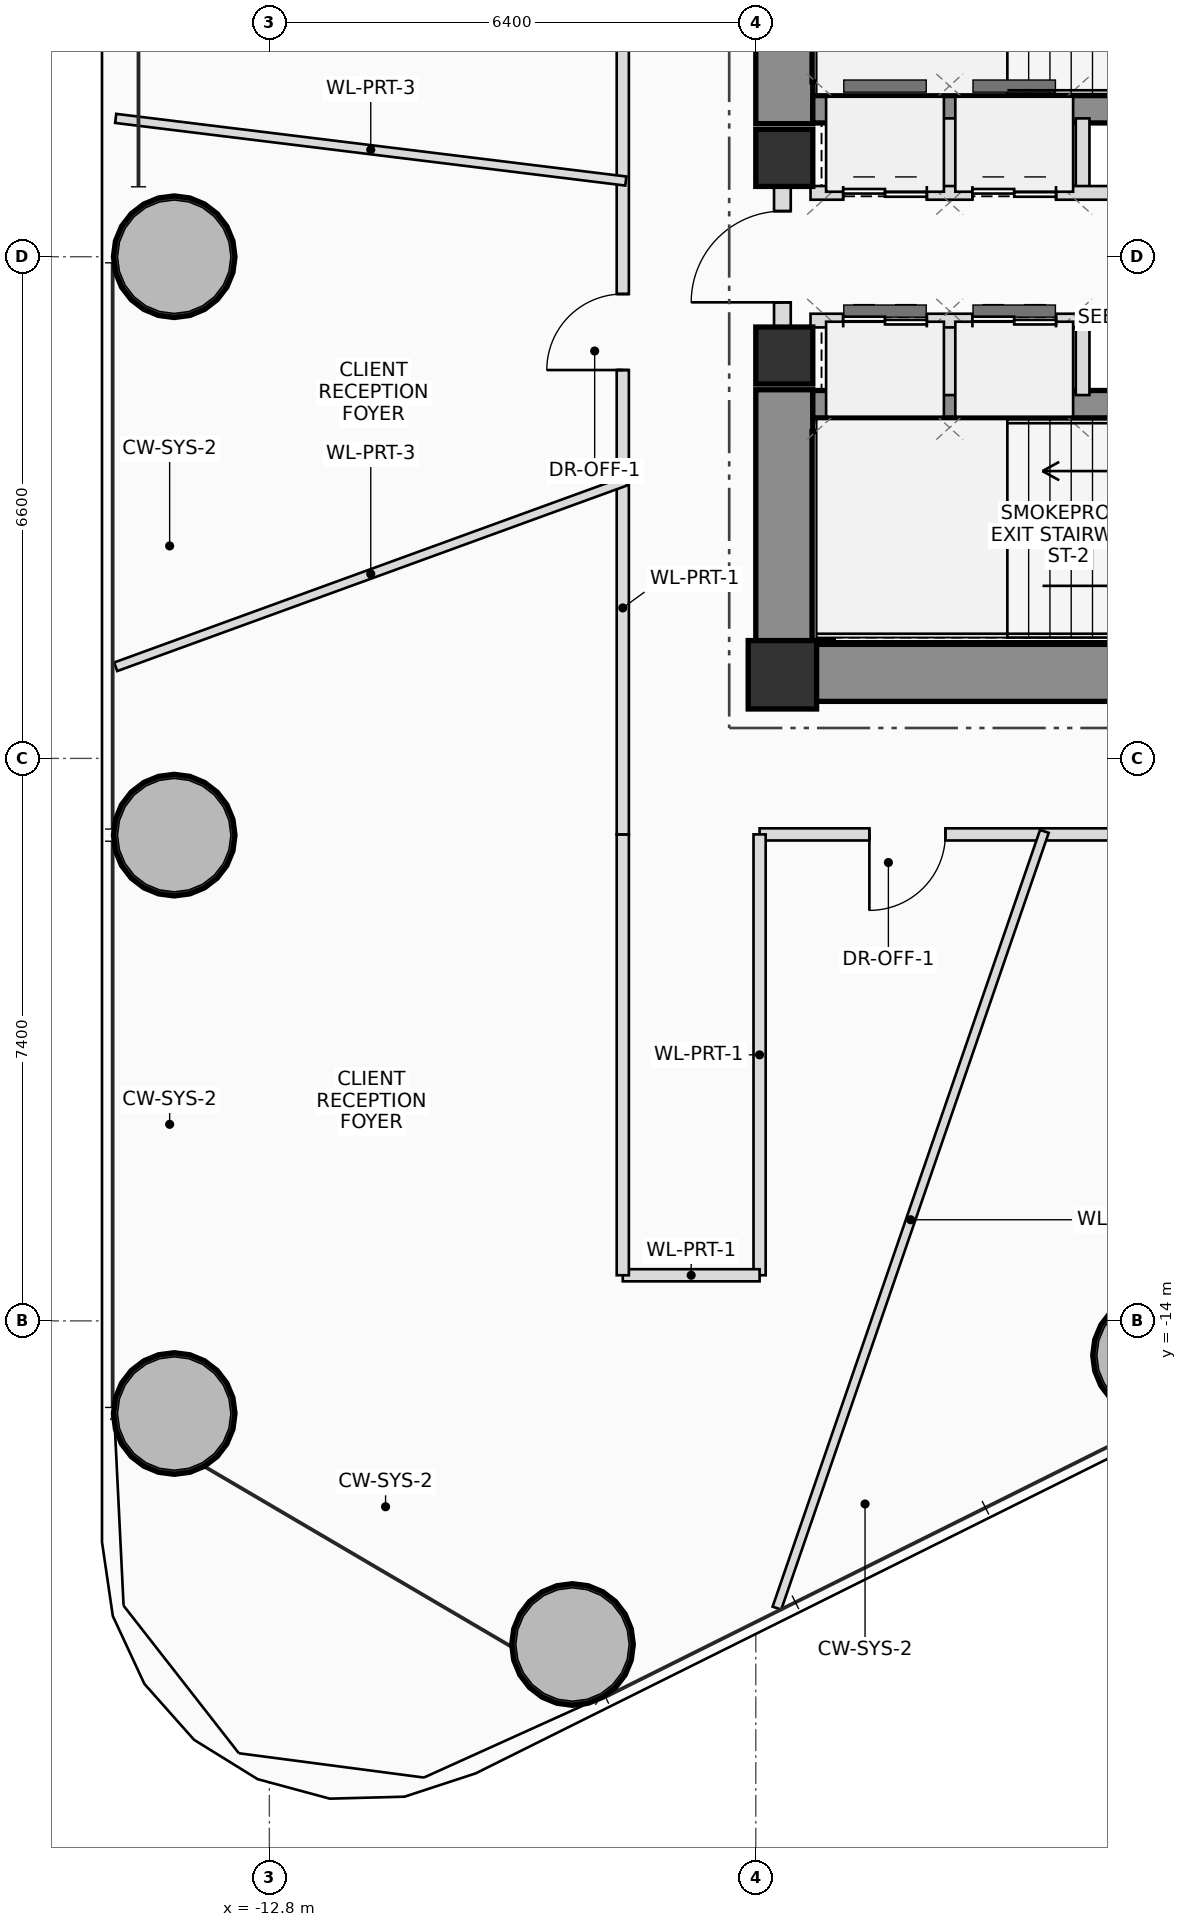
"""IFC4 building model, lengths in metres.
Left out: names, types, materials, properties, quantities, classifications, styles, units other than length and angle.
Written with IfcOpenShell. Run it as: python <this file> out.ifc"""

import sys

from ifc_helpers import new_model, si_unit, direction, frame, frame_2d, origin, origin_2d, place, context, subcontext, project, spatial, rectangle, hollow_circle, extrude, source, transform, mapped, element, fill, save


model = new_model("IFC4")
c1 = context("Model", 3, precision=1e-05, world=origin(), true_north=direction((0.0, 1.0)))
c2 = subcontext(c1, "Body", "Model", "MODEL_VIEW")
j1 = project(units=[si_unit("LENGTHUNIT", "METRE"), si_unit("PLANEANGLEUNIT", "RADIAN")], contexts=[c1])
p1 = place(None, origin())
s1 = spatial("IfcSite", under=j1, at=p1, CompositionType="ELEMENT")
p2 = place(p1, origin())
s2 = spatial("IfcBuilding", under=s1, at=p2, CompositionType="ELEMENT")
p3 = place(p2, frame((0.0, 0.0, 46.0)))
s3 = spatial("IfcBuildingStorey", under=s2, at=p3, CompositionType="ELEMENT", Elevation=46.0)
m1 = source(origin(), c2, "Body", "SweptSolid", [
    extrude(rectangle(XDim=0.9, YDim=0.9, at=origin_2d()), origin(), (0.0, 0.0, 1.0), 3.7),
])
p4 = place(p3, frame((-6.05, -5.5, 0.0), z_axis=(0.0, 0.0, 1.0), x_axis=(1.0, 0.0, 0.0)))
e1 = element("IfcColumn", 1, at=p4, inside=s3, PredefinedType="COLUMN", context=c2, shape_type="MappedRepresentation", body=[
    mapped(m1, transform((0.0, 0.0, 0.0), scale=1.0)),
])
p5 = place(p3, frame((-6.4, -5.475, 0.0), z_axis=(0.0, 0.0, 1.0), x_axis=(1.0, 0.0, 0.0)))
e2 = element("IfcWall", 2, at=p5, inside=s3, PredefinedType="SHEAR", context=c2, shape_type="SweptSolid", body=[
    extrude(rectangle(XDim=12.8, YDim=0.75, at=frame_2d((6.4, 0.0))), origin(), (0.0, 0.0, 1.0), 3.7),
])
p6 = place(p5, frame((8.6, 0.0, 0.0)))
e3 = element("IfcOpeningElement", 3, at=p6, cuts=e2, PredefinedType="OPENING", context=c2, shape_type="SweptSolid", body=[
    extrude(rectangle(XDim=1.2, YDim=2.2, at=frame_2d((0.6, 1.1))), frame((0.0, 0.385, 0.0), z_axis=(0.0, -1.0, 0.0), x_axis=(1.0, 0.0, 0.0)), (0.0, 0.0, 1.0), 0.77),
])
for number, where, z_axis, x_axis in (
    (4, (-6.025, -5.1, 0.0), (0.0, 0.0, 1.0), (0.0, 1.0, 0.0)),
    (5, (-6.025, 1.75, 0.0), (0.0, 0.0, 1.0), (0.0, 1.0, 0.0)),
):
    element("IfcWall", number, at=place(p3, frame(where, z_axis=z_axis, x_axis=x_axis)), inside=s3, PredefinedType="SHEAR", context=c2, shape_type="SweptSolid", body=[
        extrude(rectangle(XDim=3.35, YDim=0.75, at=frame_2d((1.675, 0.0))), origin(), (0.0, 0.0, 1.0), 3.7),
    ])
for number, where, z_axis, x_axis in (
    (6, (-5.65, 1.94, 0.0), (0.0, 0.0, 1.0), (1.0, 0.0, 0.0)),
    (7, (-5.65, -1.94, 0.0), (0.0, 0.0, 1.0), (1.0, 0.0, 0.0)),
):
    element("IfcWall", number, at=place(p3, frame(where, z_axis=z_axis, x_axis=x_axis)), inside=s3, PredefinedType="SHEAR", context=c2, shape_type="SweptSolid", body=[
        extrude(rectangle(XDim=11.3, YDim=0.36, at=frame_2d((5.65, 0.0))), origin(), (0.0, 0.0, 1.0), 3.7),
    ])
for number, where, z_axis, x_axis in (
    (8, (-5.52, 2.3, 0.0), (0.0, 0.0, 1.0), (0.0, 1.0, 0.0)),
    (9, (-5.52, -5.05, 0.0), (0.0, 0.0, 1.0), (0.0, 1.0, 0.0)),
):
    element("IfcWall", number, at=place(p3, frame(where, z_axis=z_axis, x_axis=x_axis)), inside=s3, PredefinedType="SHEAR", context=c2, shape_type="SweptSolid", body=[
        extrude(rectangle(XDim=2.75, YDim=0.28, at=frame_2d((1.375, 0.0))), origin(), (0.0, 0.0, 1.0), 3.7),
    ])
m2 = source(origin(), c2, "Body", "SweptSolid", [
    extrude(rectangle(XDim=0.75, YDim=0.75, at=origin_2d()), origin(), (0.0, 0.0, 1.0), 3.7),
])
for number, where, z_axis, x_axis in (
    (10, (-6.025, -1.3, 0.0), (0.0, 0.0, 1.0), (1.0, 0.0, 0.0)),
    (11, (-6.025, 1.3, 0.0), (0.0, 0.0, 1.0), (1.0, 0.0, 0.0)),
):
    element("IfcColumn", number, at=place(p3, frame(where, z_axis=z_axis, x_axis=x_axis)), inside=s3, PredefinedType="COLUMN", context=c2, shape_type="MappedRepresentation", body=[
        mapped(m2, transform((0.0, 0.0, 0.0), scale=1.0)),
    ])
m3 = source(origin(), c2, "Body", "SweptSolid", [
    extrude(hollow_circle(Radius=0.8, WallThickness=0.055, at=origin_2d()), origin(), (0.0, 0.0, 1.0), 3.7),
])
for number, where, z_axis, x_axis in (
    (12, (-8.812, -18.258, 0.0), (0.0, 0.0, 1.0), (1.0, 0.0, 0.0)),
    (13, (-1.167, -14.453, 0.0), (0.0, 0.0, 1.0), (1.0, 0.0, 0.0)),
    (14, (-14.052, 0.0, 0.0), (0.0, 0.0, 1.0), (1.0, 0.0, 0.0)),
    (15, (-14.052, -7.61, 0.0), (0.0, 0.0, 1.0), (1.0, 0.0, 0.0)),
    (16, (-14.052, -15.219, 0.0), (0.0, 0.0, 1.0), (1.0, 0.0, 0.0)),
):
    element("IfcColumn", number, at=place(p3, frame(where, z_axis=z_axis, x_axis=x_axis)), inside=s3, PredefinedType="COLUMN", context=c2, shape_type="MappedRepresentation", body=[
        mapped(m3, transform((0.0, 0.0, 0.0), scale=1.0)),
    ])
p7 = place(p3, frame((-6.05, -0.95, 0.0), z_axis=(0.0, 0.0, 1.0), x_axis=(0.0, 1.0, 0.0)))
e17 = element("IfcWall", 17, at=p7, inside=s3, PredefinedType="PLUMBINGWALL", context=c2, shape_type="SweptSolid", body=[
    extrude(rectangle(XDim=1.9, YDim=0.22, at=frame_2d((0.95, 0.0))), origin(), (0.0, 0.0, 1.0), 2.44),
])
p8 = place(p7, frame((0.35, 0.0, 0.0)))
e18 = element("IfcOpeningElement", 18, at=p8, cuts=e17, PredefinedType="OPENING", context=c2, shape_type="SweptSolid", body=[
    extrude(rectangle(XDim=1.2, YDim=2.2, at=frame_2d((0.6, 1.1))), frame((0.0, 0.12, 0.0), z_axis=(0.0, -1.0, 0.0), x_axis=(1.0, 0.0, 0.0)), (0.0, 0.0, 1.0), 0.24),
])
for number, where, z_axis, x_axis in (
    (19, (-3.85, 0.84, 0.0), (0.0, 0.0, 1.0), (0.0, 1.0, 0.0)),
    (20, (-3.85, -1.82, 0.0), (0.0, 0.0, 1.0), (0.0, 1.0, 0.0)),
    (21, (-2.1, 0.84, 0.0), (0.0, 0.0, 1.0), (0.0, 1.0, 0.0)),
    (22, (-2.1, -1.82, 0.0), (0.0, 0.0, 1.0), (0.0, 1.0, 0.0)),
):
    element("IfcWall", number, at=place(p3, frame(where, z_axis=z_axis, x_axis=x_axis)), inside=s3, PredefinedType="PLUMBINGWALL", context=c2, shape_type="SweptSolid", body=[
        extrude(rectangle(XDim=0.98, YDim=0.18, at=frame_2d((0.49, 0.0))), origin(), (0.0, 0.0, 1.0), 3.46),
    ])
p9 = place(p3, frame((-5.68, 0.84, 0.0), z_axis=(0.0, 0.0, 1.0), x_axis=(1.0, 0.0, 0.0)))
e23 = element("IfcWall", 23, at=p9, inside=s3, PredefinedType="PLUMBINGWALL", context=c2, shape_type="SweptSolid", body=[
    extrude(rectangle(XDim=11.33, YDim=0.18, at=frame_2d((5.665, 0.0))), origin(), (0.0, 0.0, 1.0), 3.46),
])
p10 = place(p9, frame((0.43, 0.0, 0.0)))
e24 = element("IfcOpeningElement", 24, at=p10, cuts=e23, PredefinedType="OPENING", context=c2, shape_type="SweptSolid", body=[
    extrude(rectangle(XDim=1.1, YDim=2.2, at=frame_2d((0.55, 1.1))), frame((0.0, 0.1, 0.0), z_axis=(0.0, -1.0, 0.0), x_axis=(1.0, 0.0, 0.0)), (0.0, 0.0, 1.0), 0.2),
])
p11 = place(p9, frame((2.13, 0.0, 0.0)))
e25 = element("IfcOpeningElement", 25, at=p11, cuts=e23, PredefinedType="OPENING", context=c2, shape_type="SweptSolid", body=[
    extrude(rectangle(XDim=1.1, YDim=2.2, at=frame_2d((0.55, 1.1))), frame((0.0, 0.1, 0.0), z_axis=(0.0, -1.0, 0.0), x_axis=(1.0, 0.0, 0.0)), (0.0, 0.0, 1.0), 0.2),
])
p12 = place(p9, frame((10.25, 0.0, 0.0)))
e26 = element("IfcOpeningElement", 26, at=p12, cuts=e23, PredefinedType="OPENING", context=c2, shape_type="SweptSolid", body=[
    extrude(rectangle(XDim=0.9, YDim=2.05, at=frame_2d((0.45, 1.025))), frame((0.0, 0.1, 0.0), z_axis=(0.0, -1.0, 0.0), x_axis=(1.0, 0.0, 0.0)), (0.0, 0.0, 1.0), 0.2),
])
p13 = place(p3, frame((-5.68, -0.84, 0.0), z_axis=(0.0, 0.0, 1.0), x_axis=(1.0, 0.0, 0.0)))
e27 = element("IfcWall", 27, at=p13, inside=s3, PredefinedType="PLUMBINGWALL", context=c2, shape_type="SweptSolid", body=[
    extrude(rectangle(XDim=11.33, YDim=0.18, at=frame_2d((5.665, 0.0))), origin(), (0.0, 0.0, 1.0), 3.46),
])
p14 = place(p13, frame((0.43, 0.0, 0.0)))
e28 = element("IfcOpeningElement", 28, at=p14, cuts=e27, PredefinedType="OPENING", context=c2, shape_type="SweptSolid", body=[
    extrude(rectangle(XDim=1.1, YDim=2.2, at=frame_2d((0.55, 1.1))), frame((0.0, 0.1, 0.0), z_axis=(0.0, -1.0, 0.0), x_axis=(1.0, 0.0, 0.0)), (0.0, 0.0, 1.0), 0.2),
])
p15 = place(p13, frame((2.13, 0.0, 0.0)))
e29 = element("IfcOpeningElement", 29, at=p15, cuts=e27, PredefinedType="OPENING", context=c2, shape_type="SweptSolid", body=[
    extrude(rectangle(XDim=1.1, YDim=2.2, at=frame_2d((0.55, 1.1))), frame((0.0, 0.1, 0.0), z_axis=(0.0, -1.0, 0.0), x_axis=(1.0, 0.0, 0.0)), (0.0, 0.0, 1.0), 0.2),
])
p16 = place(p13, frame((8.9, 0.0, 0.0)))
e30 = element("IfcOpeningElement", 30, at=p16, cuts=e27, PredefinedType="OPENING", context=c2, shape_type="SweptSolid", body=[
    extrude(rectangle(XDim=0.9, YDim=2.05, at=frame_2d((0.45, 1.025))), frame((0.0, 0.1, 0.0), z_axis=(0.0, -1.0, 0.0), x_axis=(1.0, 0.0, 0.0)), (0.0, 0.0, 1.0), 0.2),
])
p17 = place(p13, frame((10.25, 0.0, 0.0)))
e31 = element("IfcOpeningElement", 31, at=p17, cuts=e27, PredefinedType="OPENING", context=c2, shape_type="SweptSolid", body=[
    extrude(rectangle(XDim=0.9, YDim=2.05, at=frame_2d((0.45, 1.025))), frame((0.0, 0.1, 0.0), z_axis=(0.0, -1.0, 0.0), x_axis=(1.0, 0.0, 0.0)), (0.0, 0.0, 1.0), 0.2),
])
p18 = place(p3, frame((6.35, -7.6, 0.0), z_axis=(0.0, 0.0, 1.0), x_axis=(-1.0, 0.0, 0.0)))
e32 = element("IfcWall", 32, at=p18, inside=s3, PredefinedType="PARTITIONING", context=c2, shape_type="SweptSolid", body=[
    extrude(rectangle(XDim=12.7, YDim=0.16, at=frame_2d((6.35, 0.0))), origin(), (0.0, 0.0, 1.0), 2.765),
])
p19 = place(p18, frame((2.091, 0.0, 0.0)))
e33 = element("IfcOpeningElement", 33, at=p19, cuts=e32, PredefinedType="OPENING", context=c2, shape_type="SweptSolid", body=[
    extrude(rectangle(XDim=1.0, YDim=2.25, at=frame_2d((0.5, 1.125))), frame((0.0, 0.09, 0.0), z_axis=(0.0, -1.0, 0.0), x_axis=(1.0, 0.0, 0.0)), (0.0, 0.0, 1.0), 0.18),
])
p20 = place(p18, frame((6.494, 0.0, 0.0)))
e34 = element("IfcOpeningElement", 34, at=p20, cuts=e32, PredefinedType="OPENING", context=c2, shape_type="SweptSolid", body=[
    extrude(rectangle(XDim=1.0, YDim=2.25, at=frame_2d((0.5, 1.125))), frame((0.0, 0.09, 0.0), z_axis=(0.0, -1.0, 0.0), x_axis=(1.0, 0.0, 0.0)), (0.0, 0.0, 1.0), 0.18),
])
p21 = place(p18, frame((10.256, 0.0, 0.0)))
e35 = element("IfcOpeningElement", 35, at=p21, cuts=e32, PredefinedType="OPENING", context=c2, shape_type="SweptSolid", body=[
    extrude(rectangle(XDim=1.0, YDim=2.25, at=frame_2d((0.5, 1.125))), frame((0.0, 0.09, 0.0), z_axis=(0.0, -1.0, 0.0), x_axis=(1.0, 0.0, 0.0)), (0.0, 0.0, 1.0), 0.18),
])
p22 = place(p3, frame((-6.35, -7.6, 0.0), z_axis=(0.0, 0.0, 1.0), x_axis=(0.0, -1.0, 0.0)))
e36 = element("IfcWall", 36, at=p22, inside=s3, PredefinedType="PARTITIONING", context=c2, shape_type="SweptSolid", body=[
    extrude(rectangle(XDim=5.8, YDim=0.16, at=frame_2d((2.9, 0.0))), origin(), (0.0, 0.0, 1.0), 2.765),
])
p23 = place(p3, frame((-6.35, -13.4, 0.0), z_axis=(0.0, 0.0, 1.0), x_axis=(-1.0, 0.0, 0.0)))
e37 = element("IfcWall", 37, at=p23, inside=s3, PredefinedType="PARTITIONING", context=c2, shape_type="SweptSolid", body=[
    extrude(rectangle(XDim=1.8, YDim=0.16, at=frame_2d((0.9, 0.0))), origin(), (0.0, 0.0, 1.0), 2.765),
])
p24 = place(p3, frame((-8.15, -13.4, 0.0), z_axis=(0.0, 0.0, 1.0), x_axis=(0.0, 1.0, 0.0)))
e38 = element("IfcWall", 38, at=p24, inside=s3, PredefinedType="PARTITIONING", context=c2, shape_type="SweptSolid", body=[
    extrude(rectangle(XDim=5.8, YDim=0.16, at=frame_2d((2.9, 0.0))), origin(), (0.0, 0.0, 1.0), 2.765),
])
p25 = place(p3, frame((-8.15, -7.6, 0.0), z_axis=(0.0, 0.0, 1.0), x_axis=(0.0, 1.0, 0.0)))
e39 = element("IfcWall", 39, at=p25, inside=s3, PredefinedType="PARTITIONING", context=c2, shape_type="SweptSolid", body=[
    extrude(rectangle(XDim=15.2, YDim=0.16, at=frame_2d((7.6, 0.0))), origin(), (0.0, 0.0, 1.0), 2.765),
])
p26 = place(p25, frame((6.109, 0.0, 0.0)))
e40 = element("IfcOpeningElement", 40, at=p26, cuts=e39, PredefinedType="OPENING", context=c2, shape_type="SweptSolid", body=[
    extrude(rectangle(XDim=1.0, YDim=2.25, at=frame_2d((0.5, 1.125))), frame((0.0, 0.09, 0.0), z_axis=(0.0, -1.0, 0.0), x_axis=(1.0, 0.0, 0.0)), (0.0, 0.0, 1.0), 0.18),
])
p27 = place(p25, frame((11.312, 0.0, 0.0)))
e41 = element("IfcOpeningElement", 41, at=p27, cuts=e39, PredefinedType="OPENING", context=c2, shape_type="SweptSolid", body=[
    extrude(rectangle(XDim=1.0, YDim=2.25, at=frame_2d((0.5, 1.125))), frame((0.0, 0.09, 0.0), z_axis=(0.0, -1.0, 0.0), x_axis=(1.0, 0.0, 0.0)), (0.0, 0.0, 1.0), 0.18),
])
p28 = place(p3, frame((-8.11, 0.996, 0.0), z_axis=(0.0, 0.0, 1.0), x_axis=(-0.992548741741, 0.121848246885, 0.0)))
e42 = element("IfcWall", 42, at=p28, inside=s3, PredefinedType="PARTITIONING", context=c2, shape_type="SweptSolid", body=[
    extrude(rectangle(XDim=6.762, YDim=0.12, at=frame_2d((3.381, 0.0))), origin(), (0.0, 0.0, 1.0), 2.925),
])
p29 = place(p3, frame((-8.11, -2.952, 0.0), z_axis=(0.0, 0.0, 1.0), x_axis=(-0.939695583315, -0.342012003734, 0.0)))
e43 = element("IfcWall", 43, at=p29, inside=s3, PredefinedType="PARTITIONING", context=c2, shape_type="SweptSolid", body=[
    extrude(rectangle(XDim=7.143, YDim=0.12, at=frame_2d((3.571, 0.0))), origin(), (0.0, 0.0, 1.0), 2.765),
])
p30 = place(p3, frame((-2.603, -7.56, 0.0), z_axis=(0.0, 0.0, 1.0), x_axis=(-0.325570875914, -0.945517638522, 0.0)))
e44 = element("IfcWall", 44, at=p30, inside=s3, PredefinedType="PARTITIONING", context=c2, shape_type="SweptSolid", body=[
    extrude(rectangle(XDim=10.808, YDim=0.12, at=frame_2d((5.404, 0.0))), origin(), (0.0, 0.0, 1.0), 2.765),
])
p31 = place(p8, origin())
e45 = element("IfcDoor", 45, at=p31, inside=s3, OperationType="SINGLE_SWING_LEFT", PredefinedType="DOOR", context=c2, shape_type="SweptSolid", body=[
    extrude(rectangle(XDim=1.2, YDim=2.2, at=frame_2d((0.6, 1.1))), frame((0.0, 0.025, 0.0), z_axis=(0.0, -1.0, 0.0), x_axis=(1.0, 0.0, 0.0)), (0.0, 0.0, 1.0), 0.05),
])
fill(e18, e45)
p32 = place(p10, origin())
e46 = element("IfcDoor", 46, at=p32, inside=s3, OperationType="DOUBLE_DOOR_SLIDING", PredefinedType="DOOR", context=c2, shape_type="SweptSolid", body=[
    extrude(rectangle(XDim=1.1, YDim=2.2, at=frame_2d((0.55, 1.1))), frame((0.0, 0.025, 0.0), z_axis=(0.0, -1.0, 0.0), x_axis=(1.0, 0.0, 0.0)), (0.0, 0.0, 1.0), 0.05),
])
fill(e24, e46)
p33 = place(p11, origin())
e47 = element("IfcDoor", 47, at=p33, inside=s3, OperationType="DOUBLE_DOOR_SLIDING", PredefinedType="DOOR", context=c2, shape_type="SweptSolid", body=[
    extrude(rectangle(XDim=1.1, YDim=2.2, at=frame_2d((0.55, 1.1))), frame((0.0, 0.025, 0.0), z_axis=(0.0, -1.0, 0.0), x_axis=(1.0, 0.0, 0.0)), (0.0, 0.0, 1.0), 0.05),
])
fill(e25, e47)
p34 = place(p14, origin())
e48 = element("IfcDoor", 48, at=p34, inside=s3, OperationType="DOUBLE_DOOR_SLIDING", PredefinedType="DOOR", context=c2, shape_type="SweptSolid", body=[
    extrude(rectangle(XDim=1.1, YDim=2.2, at=frame_2d((0.55, 1.1))), frame((0.0, 0.025, 0.0), z_axis=(0.0, -1.0, 0.0), x_axis=(1.0, 0.0, 0.0)), (0.0, 0.0, 1.0), 0.05),
])
fill(e28, e48)
p35 = place(p15, origin())
e49 = element("IfcDoor", 49, at=p35, inside=s3, OperationType="DOUBLE_DOOR_SLIDING", PredefinedType="DOOR", context=c2, shape_type="SweptSolid", body=[
    extrude(rectangle(XDim=1.1, YDim=2.2, at=frame_2d((0.55, 1.1))), frame((0.0, 0.025, 0.0), z_axis=(0.0, -1.0, 0.0), x_axis=(1.0, 0.0, 0.0)), (0.0, 0.0, 1.0), 0.05),
])
fill(e29, e49)
p36 = place(p21, origin())
e50 = element("IfcDoor", 50, at=p36, inside=s3, OperationType="SINGLE_SWING_RIGHT", PredefinedType="DOOR", context=c2, shape_type="SweptSolid", body=[
    extrude(rectangle(XDim=1.0, YDim=2.25, at=frame_2d((0.5, 1.125))), frame((0.0, 0.025, 0.0), z_axis=(0.0, -1.0, 0.0), x_axis=(1.0, 0.0, 0.0)), (0.0, 0.0, 1.0), 0.05),
])
fill(e35, e50)
p37 = place(p26, origin())
e51 = element("IfcDoor", 51, at=p37, inside=s3, OperationType="SINGLE_SWING_LEFT", PredefinedType="DOOR", context=c2, shape_type="SweptSolid", body=[
    extrude(rectangle(XDim=1.0, YDim=2.25, at=frame_2d((0.5, 1.125))), frame((0.0, 0.025, 0.0), z_axis=(0.0, -1.0, 0.0), x_axis=(1.0, 0.0, 0.0)), (0.0, 0.0, 1.0), 0.05),
])
fill(e40, e51)
save(model, sys.argv[1])
